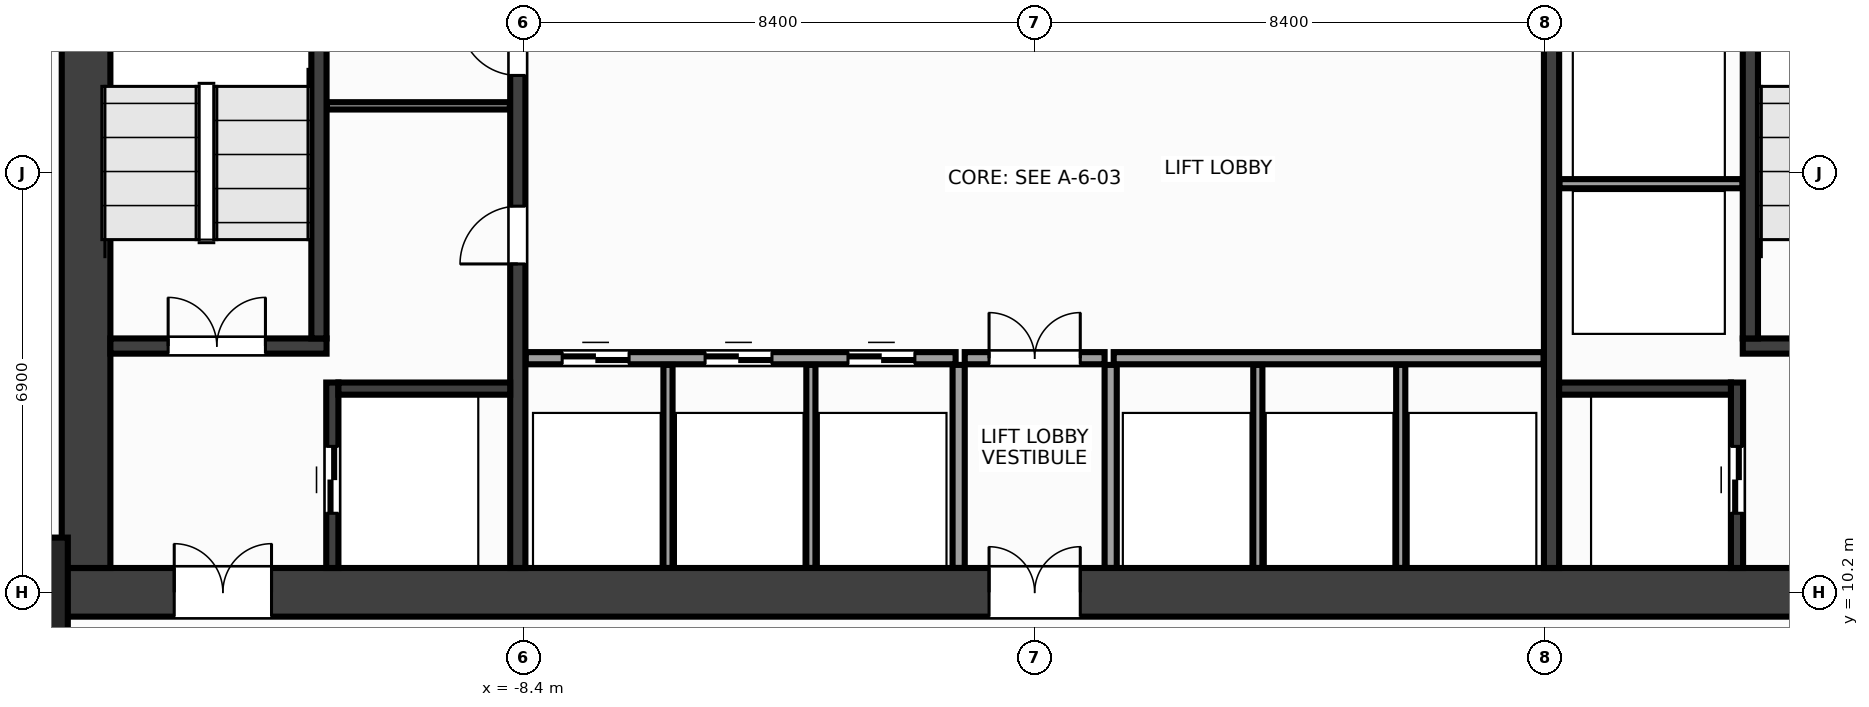
"""IFC4 building model, lengths in metres.
Left out: names, types, materials, properties, quantities, classifications, styles, units other than length and angle.
Written with IfcOpenShell. Run it as: python <this file> out.ifc"""

import sys

from ifc_helpers import new_model, si_unit, direction, frame, frame_2d, origin, origin_2d, place, context, subcontext, project, spatial, rectangle, extrude, source, transform, mapped, element, fill, save


model = new_model("IFC4")
c1 = context("Model", 3, precision=1e-05, world=origin(), true_north=direction((0.0, 1.0)))
c2 = subcontext(c1, "Body", "Model", "MODEL_VIEW")
j1 = project(units=[si_unit("LENGTHUNIT", "METRE"), si_unit("PLANEANGLEUNIT", "RADIAN")], contexts=[c1])
p1 = place(None, origin())
s1 = spatial("IfcSite", under=j1, at=p1, CompositionType="ELEMENT")
p2 = place(p1, origin())
s2 = spatial("IfcBuilding", under=s1, at=p2, CompositionType="ELEMENT")
p3 = place(p2, frame((0.0, 0.0, 41.6)))
s3 = spatial("IfcBuildingStorey", under=s2, at=p3, CompositionType="ELEMENT", Elevation=41.6)
m1 = source(origin(), c2, "Body", "SweptSolid", [
    extrude(rectangle(XDim=32.0, YDim=0.8, at=frame_2d((16.0, 0.0))), origin(), (0.0, 0.0, 1.0), 3.6),
])
p4 = place(p3, frame((-16.0, 10.2, 0.0), z_axis=(0.0, 0.0, 1.0), x_axis=(1.0, 0.0, 0.0)))
e1 = element("IfcWall", 1, at=p4, inside=s3, PredefinedType="SHEAR", context=c2, shape_type="MappedRepresentation", body=[
    mapped(m1, transform((0.0, 0.0, 0.0), x_axis=(1.0, 0.0, 0.0), y_axis=(0.0, 1.0, 0.0), z_axis=(0.0, 0.0, 1.0), scale=1.0)),
])
p5 = place(p4, frame((1.85, 0.0, 0.0)))
e2 = element("IfcOpeningElement", 2, at=p5, cuts=e1, PredefinedType="OPENING", context=c2, shape_type="SweptSolid", body=[
    extrude(rectangle(XDim=1.6, YDim=2.15, at=frame_2d((0.8, 1.075))), frame((0.0, 0.412, 0.0), z_axis=(0.0, -1.0, 0.0), x_axis=(1.0, 0.0, 0.0)), (0.0, 0.0, 1.0), 0.824),
])
p6 = place(p4, frame((28.55, 0.0, 0.0)))
e3 = element("IfcOpeningElement", 3, at=p6, cuts=e1, PredefinedType="OPENING", context=c2, shape_type="SweptSolid", body=[
    extrude(rectangle(XDim=1.6, YDim=2.15, at=frame_2d((0.8, 1.075))), frame((0.0, 0.412, 0.0), z_axis=(0.0, -1.0, 0.0), x_axis=(1.0, 0.0, 0.0)), (0.0, 0.0, 1.0), 0.824),
])
p7 = place(p4, frame((15.25, 0.0, 0.0)))
e4 = element("IfcOpeningElement", 4, at=p7, cuts=e1, PredefinedType="OPENING", context=c2, shape_type="SweptSolid", body=[
    extrude(rectangle(XDim=1.5, YDim=2.2, at=frame_2d((0.75, 1.1))), frame((0.0, 0.412, 0.0), z_axis=(0.0, -1.0, 0.0), x_axis=(1.0, 0.0, 0.0)), (0.0, 0.0, 1.0), 0.824),
])
m2 = source(origin(), c2, "Body", "SweptSolid", [
    extrude(rectangle(XDim=12.8, YDim=0.8, at=frame_2d((6.4, 0.0))), origin(), (0.0, 0.0, 1.0), 3.6),
])
p8 = place(p3, frame((-15.6, 10.6, 0.0), z_axis=(0.0, 0.0, 1.0), x_axis=(0.0, 1.0, 0.0)))
e5 = element("IfcWall", 5, at=p8, inside=s3, PredefinedType="SHEAR", context=c2, shape_type="MappedRepresentation", body=[
    mapped(m2, transform((0.0, 0.0, 0.0), x_axis=(1.0, 0.0, 0.0), y_axis=(0.0, 1.0, 0.0), z_axis=(0.0, 0.0, 1.0), scale=1.0)),
])
m3 = source(origin(), c2, "Body", "SweptSolid", [
    extrude(rectangle(XDim=12.8, YDim=0.25, at=frame_2d((6.4, 0.0))), origin(), (0.0, 0.0, 1.0), 3.6),
])
p9 = place(p3, frame((-8.5, 10.6, 0.0), z_axis=(0.0, 0.0, 1.0), x_axis=(0.0, 1.0, 0.0)))
e6 = element("IfcWall", 6, at=p9, inside=s3, PredefinedType="SHEAR", context=c2, shape_type="MappedRepresentation", body=[
    mapped(m3, transform((0.0, 0.0, 0.0), x_axis=(1.0, 0.0, 0.0), y_axis=(0.0, 1.0, 0.0), z_axis=(0.0, 0.0, 1.0), scale=1.0)),
])
p10 = place(p9, frame((5.0, 0.0, 0.0)))
e7 = element("IfcOpeningElement", 7, at=p10, cuts=e6, PredefinedType="OPENING", context=c2, shape_type="SweptSolid", body=[
    extrude(rectangle(XDim=0.95, YDim=2.15, at=frame_2d((0.475, 1.075))), frame((0.0, 0.137, 0.0), z_axis=(0.0, -1.0, 0.0), x_axis=(1.0, 0.0, 0.0)), (0.0, 0.0, 1.0), 0.274),
])
p11 = place(p9, frame((8.1, 0.0, 0.0)))
e8 = element("IfcOpeningElement", 8, at=p11, cuts=e6, PredefinedType="OPENING", context=c2, shape_type="SweptSolid", body=[
    extrude(rectangle(XDim=0.95, YDim=2.15, at=frame_2d((0.475, 1.075))), frame((0.0, 0.137, 0.0), z_axis=(0.0, -1.0, 0.0), x_axis=(1.0, 0.0, 0.0)), (0.0, 0.0, 1.0), 0.274),
])
p12 = place(p3, frame((8.5, 10.6, 0.0), z_axis=(0.0, 0.0, 1.0), x_axis=(0.0, 1.0, 0.0)))
e9 = element("IfcWall", 9, at=p12, inside=s3, PredefinedType="SHEAR", context=c2, shape_type="MappedRepresentation", body=[
    mapped(m3, transform((0.0, 0.0, 0.0), x_axis=(1.0, 0.0, 0.0), y_axis=(0.0, 1.0, 0.0), z_axis=(0.0, 0.0, 1.0), scale=1.0)),
])
p13 = place(p12, frame((9.85, 0.0, 0.0)))
e10 = element("IfcOpeningElement", 10, at=p13, cuts=e9, PredefinedType="OPENING", context=c2, shape_type="SweptSolid", body=[
    extrude(rectangle(XDim=0.95, YDim=2.15, at=frame_2d((0.475, 1.075))), frame((0.0, 0.137, 0.0), z_axis=(0.0, -1.0, 0.0), x_axis=(1.0, 0.0, 0.0)), (0.0, 0.0, 1.0), 0.274),
])
m4 = source(origin(), c2, "Body", "SweptSolid", [
    extrude(rectangle(XDim=3.555, YDim=0.25, at=frame_2d((1.777, 0.0))), origin(), (0.0, 0.0, 1.0), 3.6),
])
p14 = place(p3, frame((-15.2, 14.25, 0.0), z_axis=(0.0, 0.0, 1.0), x_axis=(1.0, 0.0, 0.0)))
e11 = element("IfcWall", 11, at=p14, inside=s3, PredefinedType="SHEAR", context=c2, shape_type="MappedRepresentation", body=[
    mapped(m4, transform((0.0, 0.0, 0.0), x_axis=(1.0, 0.0, 0.0), y_axis=(0.0, 1.0, 0.0), z_axis=(0.0, 0.0, 1.0), scale=1.0)),
])
p15 = place(p14, frame((0.95, 0.0, 0.0)))
e12 = element("IfcOpeningElement", 12, at=p15, cuts=e11, PredefinedType="OPENING", context=c2, shape_type="SweptSolid", body=[
    extrude(rectangle(XDim=1.6, YDim=2.15, at=frame_2d((0.8, 1.075))), frame((0.0, 0.137, 0.0), z_axis=(0.0, -1.0, 0.0), x_axis=(1.0, 0.0, 0.0)), (0.0, 0.0, 1.0), 0.274),
])
m5 = source(origin(), c2, "Body", "SweptSolid", [
    extrude(rectangle(XDim=9.025, YDim=0.25, at=frame_2d((4.512, 0.0))), origin(), (0.0, 0.0, 1.0), 3.6),
])
p16 = place(p3, frame((-11.77, 14.375, 0.0), z_axis=(0.0, 0.0, 1.0), x_axis=(0.0, 1.0, 0.0)))
e13 = element("IfcWall", 13, at=p16, inside=s3, PredefinedType="SHEAR", context=c2, shape_type="MappedRepresentation", body=[
    mapped(m5, transform((0.0, 0.0, 0.0), x_axis=(1.0, 0.0, 0.0), y_axis=(0.0, 1.0, 0.0), z_axis=(0.0, 0.0, 1.0), scale=1.0)),
])
p17 = place(p3, frame((11.645, 14.25, 0.0), z_axis=(0.0, 0.0, 1.0), x_axis=(1.0, 0.0, 0.0)))
e14 = element("IfcWall", 14, at=p17, inside=s3, PredefinedType="SHEAR", context=c2, shape_type="MappedRepresentation", body=[
    mapped(m4, transform((0.0, 0.0, 0.0), x_axis=(1.0, 0.0, 0.0), y_axis=(0.0, 1.0, 0.0), z_axis=(0.0, 0.0, 1.0), scale=1.0)),
])
p18 = place(p17, frame((0.95, 0.0, 0.0)))
e15 = element("IfcOpeningElement", 15, at=p18, cuts=e14, PredefinedType="OPENING", context=c2, shape_type="SweptSolid", body=[
    extrude(rectangle(XDim=1.6, YDim=2.15, at=frame_2d((0.8, 1.075))), frame((0.0, 0.137, 0.0), z_axis=(0.0, -1.0, 0.0), x_axis=(1.0, 0.0, 0.0)), (0.0, 0.0, 1.0), 0.274),
])
p19 = place(p3, frame((11.77, 14.375, 0.0), z_axis=(0.0, 0.0, 1.0), x_axis=(0.0, 1.0, 0.0)))
e16 = element("IfcWall", 16, at=p19, inside=s3, PredefinedType="SHEAR", context=c2, shape_type="MappedRepresentation", body=[
    mapped(m5, transform((0.0, 0.0, 0.0), x_axis=(1.0, 0.0, 0.0), y_axis=(0.0, 1.0, 0.0), z_axis=(0.0, 0.0, 1.0), scale=1.0)),
])
m6 = source(origin(), c2, "Body", "SweptSolid", [
    extrude(rectangle(XDim=3.05, YDim=0.2, at=frame_2d((1.525, 0.0))), origin(), (0.0, 0.0, 1.0), 3.6),
])
p20 = place(p3, frame((-11.55, 10.6, 0.0), z_axis=(0.0, 0.0, 1.0), x_axis=(0.0, 1.0, 0.0)))
e17 = element("IfcWall", 17, at=p20, inside=s3, PredefinedType="SHEAR", context=c2, shape_type="MappedRepresentation", body=[
    mapped(m6, transform((0.0, 0.0, 0.0), x_axis=(1.0, 0.0, 0.0), y_axis=(0.0, 1.0, 0.0), z_axis=(0.0, 0.0, 1.0), scale=1.0)),
])
p21 = place(p20, frame((0.9, 0.0, 0.0)))
e18 = element("IfcOpeningElement", 18, at=p21, cuts=e17, PredefinedType="OPENING", context=c2, shape_type="SweptSolid", body=[
    extrude(rectangle(XDim=1.1, YDim=2.15, at=frame_2d((0.55, 1.075))), frame((0.0, 0.112, 0.0), z_axis=(0.0, -1.0, 0.0), x_axis=(1.0, 0.0, 0.0)), (0.0, 0.0, 1.0), 0.224),
])
m7 = source(origin(), c2, "Body", "SweptSolid", [
    extrude(rectangle(XDim=2.825, YDim=0.2, at=frame_2d((1.413, 0.0))), origin(), (0.0, 0.0, 1.0), 3.6),
])
p22 = place(p3, frame((-11.45, 13.55, 0.0), z_axis=(0.0, 0.0, 1.0), x_axis=(1.0, 0.0, 0.0)))
e19 = element("IfcWall", 19, at=p22, inside=s3, PredefinedType="SHEAR", context=c2, shape_type="MappedRepresentation", body=[
    mapped(m7, transform((0.0, 0.0, 0.0), x_axis=(1.0, 0.0, 0.0), y_axis=(0.0, 1.0, 0.0), z_axis=(0.0, 0.0, 1.0), scale=1.0)),
])
p23 = place(p3, frame((11.55, 10.6, 0.0), z_axis=(0.0, 0.0, 1.0), x_axis=(0.0, 1.0, 0.0)))
e20 = element("IfcWall", 20, at=p23, inside=s3, PredefinedType="SHEAR", context=c2, shape_type="MappedRepresentation", body=[
    mapped(m6, transform((0.0, 0.0, 0.0), x_axis=(1.0, 0.0, 0.0), y_axis=(0.0, 1.0, 0.0), z_axis=(0.0, 0.0, 1.0), scale=1.0)),
])
p24 = place(p23, frame((0.9, 0.0, 0.0)))
e21 = element("IfcOpeningElement", 21, at=p24, cuts=e20, PredefinedType="OPENING", context=c2, shape_type="SweptSolid", body=[
    extrude(rectangle(XDim=1.1, YDim=2.15, at=frame_2d((0.55, 1.075))), frame((0.0, 0.112, 0.0), z_axis=(0.0, -1.0, 0.0), x_axis=(1.0, 0.0, 0.0)), (0.0, 0.0, 1.0), 0.224),
])
p25 = place(p3, frame((8.625, 13.55, 0.0), z_axis=(0.0, 0.0, 1.0), x_axis=(1.0, 0.0, 0.0)))
e22 = element("IfcWall", 22, at=p25, inside=s3, PredefinedType="SHEAR", context=c2, shape_type="MappedRepresentation", body=[
    mapped(m7, transform((0.0, 0.0, 0.0), x_axis=(1.0, 0.0, 0.0), y_axis=(0.0, 1.0, 0.0), z_axis=(0.0, 0.0, 1.0), scale=1.0)),
])
m8 = source(origin(), c2, "Body", "SweptSolid", [
    extrude(rectangle(XDim=1.8, YDim=1.8, at=origin_2d()), origin(), (0.0, 0.0, 1.0), 3.6),
])
p26 = place(p3, frame((-16.8, 10.2, 0.0), z_axis=(0.0, 0.0, 1.0), x_axis=(1.0, 0.0, 0.0)))
e23 = element("IfcColumn", 23, at=p26, inside=s3, PredefinedType="COLUMN", context=c2, shape_type="MappedRepresentation", body=[
    mapped(m8, transform((0.0, 0.0, 0.0), x_axis=(1.0, 0.0, 0.0), y_axis=(0.0, 1.0, 0.0), z_axis=(0.0, 0.0, 1.0), scale=1.0)),
])
m9 = source(origin(), c2, "Body", "SweptSolid", [
    extrude(rectangle(XDim=3.01, YDim=0.12, at=frame_2d((1.505, 0.0))), origin(), (0.0, 0.0, 1.0), 3.36),
])
p27 = place(p3, frame((-11.64, 18.2, 0.0), z_axis=(0.0, 0.0, 1.0), x_axis=(1.0, 0.0, 0.0)))
e24 = element("IfcWall", 24, at=p27, inside=s3, PredefinedType="PARTITIONING", context=c2, shape_type="MappedRepresentation", body=[
    mapped(m9, transform((0.0, 0.0, 0.0), x_axis=(1.0, 0.0, 0.0), y_axis=(0.0, 1.0, 0.0), z_axis=(0.0, 0.0, 1.0), scale=1.0)),
])
m10 = source(origin(), c2, "Body", "SweptSolid", [
    extrude(rectangle(XDim=3.01, YDim=0.15, at=frame_2d((1.505, 0.0))), origin(), (0.0, 0.0, 1.0), 3.36),
])
p28 = place(p3, frame((8.63, 16.92, 0.0), z_axis=(0.0, 0.0, 1.0), x_axis=(1.0, 0.0, 0.0)))
e25 = element("IfcWall", 25, at=p28, inside=s3, PredefinedType="PARTITIONING", context=c2, shape_type="MappedRepresentation", body=[
    mapped(m10, transform((0.0, 0.0, 0.0), x_axis=(1.0, 0.0, 0.0), y_axis=(0.0, 1.0, 0.0), z_axis=(0.0, 0.0, 1.0), scale=1.0)),
])
m11 = source(origin(), c2, "Body", "SweptSolid", [
    extrude(rectangle(XDim=7.07, YDim=0.2, at=frame_2d((3.535, 0.0))), origin(), (0.0, 0.0, 1.0), 3.36),
])
p29 = place(p3, frame((-8.37, 14.05, 0.0), z_axis=(0.0, 0.0, 1.0), x_axis=(1.0, 0.0, 0.0)))
e26 = element("IfcWall", 26, at=p29, inside=s3, PredefinedType="PARTITIONING", context=c2, shape_type="MappedRepresentation", body=[
    mapped(m11, transform((0.0, 0.0, 0.0), x_axis=(1.0, 0.0, 0.0), y_axis=(0.0, 1.0, 0.0), z_axis=(0.0, 0.0, 1.0), scale=1.0)),
])
p30 = place(p29, frame((0.6, 0.0, 0.0)))
e27 = element("IfcOpeningElement", 27, at=p30, cuts=e26, PredefinedType="OPENING", context=c2, shape_type="SweptSolid", body=[
    extrude(rectangle(XDim=1.1, YDim=2.15, at=frame_2d((0.55, 1.075))), frame((0.0, 0.112, 0.0), z_axis=(0.0, -1.0, 0.0), x_axis=(1.0, 0.0, 0.0)), (0.0, 0.0, 1.0), 0.224),
])
p31 = place(p29, frame((2.95, 0.0, 0.0)))
e28 = element("IfcOpeningElement", 28, at=p31, cuts=e26, PredefinedType="OPENING", context=c2, shape_type="SweptSolid", body=[
    extrude(rectangle(XDim=1.1, YDim=2.15, at=frame_2d((0.55, 1.075))), frame((0.0, 0.112, 0.0), z_axis=(0.0, -1.0, 0.0), x_axis=(1.0, 0.0, 0.0)), (0.0, 0.0, 1.0), 0.224),
])
p32 = place(p29, frame((5.3, 0.0, 0.0)))
e29 = element("IfcOpeningElement", 29, at=p32, cuts=e26, PredefinedType="OPENING", context=c2, shape_type="SweptSolid", body=[
    extrude(rectangle(XDim=1.1, YDim=2.15, at=frame_2d((0.55, 1.075))), frame((0.0, 0.112, 0.0), z_axis=(0.0, -1.0, 0.0), x_axis=(1.0, 0.0, 0.0)), (0.0, 0.0, 1.0), 0.224),
])
p33 = place(p3, frame((1.3, 14.05, 0.0), z_axis=(0.0, 0.0, 1.0), x_axis=(1.0, 0.0, 0.0)))
e30 = element("IfcWall", 30, at=p33, inside=s3, PredefinedType="PARTITIONING", context=c2, shape_type="MappedRepresentation", body=[
    mapped(m11, transform((0.0, 0.0, 0.0), x_axis=(1.0, 0.0, 0.0), y_axis=(0.0, 1.0, 0.0), z_axis=(0.0, 0.0, 1.0), scale=1.0)),
])
m12 = source(origin(), c2, "Body", "SweptSolid", [
    extrude(rectangle(XDim=3.34, YDim=0.2, at=frame_2d((1.67, 0.0))), origin(), (0.0, 0.0, 1.0), 3.36),
])
for number, where, z_axis, x_axis in (
    (31, (-1.25, 10.6, 0.0), (0.0, 0.0, 1.0), (0.0, 1.0, 0.0)),
    (32, (1.25, 10.6, 0.0), (0.0, 0.0, 1.0), (0.0, 1.0, 0.0)),
):
    element("IfcWall", number, at=place(p3, frame(where, z_axis=z_axis, x_axis=x_axis)), inside=s3, PredefinedType="PARTITIONING", context=c2, shape_type="MappedRepresentation", body=[
        mapped(m12, transform((0.0, 0.0, 0.0), x_axis=(1.0, 0.0, 0.0), y_axis=(0.0, 1.0, 0.0), z_axis=(0.0, 0.0, 1.0), scale=1.0)),
    ])
m13 = source(origin(), c2, "Body", "SweptSolid", [
    extrude(rectangle(XDim=2.3, YDim=0.2, at=frame_2d((1.15, 0.0))), origin(), (0.0, 0.0, 1.0), 3.36),
])
p34 = place(p3, frame((-1.15, 14.05, 0.0), z_axis=(0.0, 0.0, 1.0), x_axis=(1.0, 0.0, 0.0)))
e33 = element("IfcWall", 33, at=p34, inside=s3, PredefinedType="PARTITIONING", context=c2, shape_type="MappedRepresentation", body=[
    mapped(m13, transform((0.0, 0.0, 0.0), x_axis=(1.0, 0.0, 0.0), y_axis=(0.0, 1.0, 0.0), z_axis=(0.0, 0.0, 1.0), scale=1.0)),
])
p35 = place(p34, frame((0.4, 0.0, 0.0)))
e34 = element("IfcOpeningElement", 34, at=p35, cuts=e33, PredefinedType="OPENING", context=c2, shape_type="SweptSolid", body=[
    extrude(rectangle(XDim=1.5, YDim=2.2, at=frame_2d((0.75, 1.1))), frame((0.0, 0.112, 0.0), z_axis=(0.0, -1.0, 0.0), x_axis=(1.0, 0.0, 0.0)), (0.0, 0.0, 1.0), 0.224),
])
m14 = source(origin(), c2, "Body", "SweptSolid", [
    extrude(rectangle(XDim=3.34, YDim=0.15, at=frame_2d((1.67, 0.0))), origin(), (0.0, 0.0, 1.0), 3.36),
])
for number, where, z_axis, x_axis in (
    (35, (-6.03, 10.6, 0.0), (0.0, 0.0, 1.0), (0.0, 1.0, 0.0)),
    (36, (-3.68, 10.6, 0.0), (0.0, 0.0, 1.0), (0.0, 1.0, 0.0)),
    (37, (3.67, 10.6, 0.0), (0.0, 0.0, 1.0), (0.0, 1.0, 0.0)),
    (38, (6.02, 10.6, 0.0), (0.0, 0.0, 1.0), (0.0, 1.0, 0.0)),
):
    element("IfcWall", number, at=place(p3, frame(where, z_axis=z_axis, x_axis=x_axis)), inside=s3, PredefinedType="PARTITIONING", context=c2, shape_type="MappedRepresentation", body=[
        mapped(m14, transform((0.0, 0.0, 0.0), x_axis=(1.0, 0.0, 0.0), y_axis=(0.0, 1.0, 0.0), z_axis=(0.0, 0.0, 1.0), scale=1.0)),
    ])
m15 = source(origin(), c2, "Body", "SweptSolid", [
    extrude(rectangle(XDim=1.6, YDim=2.15, at=frame_2d((0.8, 1.075))), frame((0.0, 0.025, 0.0), z_axis=(0.0, -1.0, 0.0), x_axis=(1.0, 0.0, 0.0)), (0.0, 0.0, 1.0), 0.05),
])
p36 = place(p15, origin())
e39 = element("IfcDoor", 39, at=p36, inside=s3, OperationType="DOUBLE_DOOR_SINGLE_SWING", PredefinedType="DOOR", context=c2, shape_type="MappedRepresentation", body=[
    mapped(m15, transform((0.0, 0.0, 0.0), x_axis=(1.0, 0.0, 0.0), y_axis=(0.0, 1.0, 0.0), z_axis=(0.0, 0.0, 1.0), scale=1.0)),
])
fill(e12, e39)
p37 = place(p5, origin())
e40 = element("IfcDoor", 40, at=p37, inside=s3, OperationType="DOUBLE_DOOR_SINGLE_SWING", PredefinedType="DOOR", context=c2, shape_type="MappedRepresentation", body=[
    mapped(m15, transform((0.0, 0.0, 0.0), x_axis=(1.0, 0.0, 0.0), y_axis=(0.0, 1.0, 0.0), z_axis=(0.0, 0.0, 1.0), scale=1.0)),
])
fill(e2, e40)
m16 = source(origin(), c2, "Body", "SweptSolid", [
    extrude(rectangle(XDim=1.1, YDim=2.15, at=frame_2d((0.55, 1.075))), frame((0.0, 0.025, 0.0), z_axis=(0.0, -1.0, 0.0), x_axis=(1.0, 0.0, 0.0)), (0.0, 0.0, 1.0), 0.05),
])
p38 = place(p21, origin())
e41 = element("IfcDoor", 41, at=p38, inside=s3, OperationType="DOUBLE_DOOR_SLIDING", PredefinedType="DOOR", context=c2, shape_type="MappedRepresentation", body=[
    mapped(m16, transform((0.0, 0.0, 0.0), x_axis=(1.0, 0.0, 0.0), y_axis=(0.0, 1.0, 0.0), z_axis=(0.0, 0.0, 1.0), scale=1.0)),
])
fill(e18, e41)
p39 = place(p24, origin())
e42 = element("IfcDoor", 42, at=p39, inside=s3, OperationType="DOUBLE_DOOR_SLIDING", PredefinedType="DOOR", context=c2, shape_type="MappedRepresentation", body=[
    mapped(m16, transform((0.0, 0.0, 0.0), x_axis=(1.0, 0.0, 0.0), y_axis=(0.0, 1.0, 0.0), z_axis=(0.0, 0.0, 1.0), scale=1.0)),
])
fill(e21, e42)
m17 = source(origin(), c2, "Body", "SweptSolid", [
    extrude(rectangle(XDim=0.95, YDim=2.15, at=frame_2d((0.475, 1.075))), frame((0.0, 0.025, 0.0), z_axis=(0.0, -1.0, 0.0), x_axis=(1.0, 0.0, 0.0)), (0.0, 0.0, 1.0), 0.05),
])
p40 = place(p10, origin())
e43 = element("IfcDoor", 43, at=p40, inside=s3, OperationType="SINGLE_SWING_LEFT", PredefinedType="DOOR", context=c2, shape_type="MappedRepresentation", body=[
    mapped(m17, transform((0.0, 0.0, 0.0), x_axis=(1.0, 0.0, 0.0), y_axis=(0.0, 1.0, 0.0), z_axis=(0.0, 0.0, 1.0), scale=1.0)),
])
fill(e7, e43)
p41 = place(p11, origin())
e44 = element("IfcDoor", 44, at=p41, inside=s3, OperationType="SINGLE_SWING_RIGHT", PredefinedType="DOOR", context=c2, shape_type="MappedRepresentation", body=[
    mapped(m17, transform((0.0, 0.0, 0.0), x_axis=(1.0, 0.0, 0.0), y_axis=(0.0, 1.0, 0.0), z_axis=(0.0, 0.0, 1.0), scale=1.0)),
])
fill(e8, e44)
p42 = place(p30, origin())
e45 = element("IfcDoor", 45, at=p42, inside=s3, OperationType="DOUBLE_DOOR_SLIDING", PredefinedType="DOOR", context=c2, shape_type="MappedRepresentation", body=[
    mapped(m16, transform((0.0, 0.0, 0.0), x_axis=(1.0, 0.0, 0.0), y_axis=(0.0, 1.0, 0.0), z_axis=(0.0, 0.0, 1.0), scale=1.0)),
])
fill(e27, e45)
p43 = place(p31, origin())
e46 = element("IfcDoor", 46, at=p43, inside=s3, OperationType="DOUBLE_DOOR_SLIDING", PredefinedType="DOOR", context=c2, shape_type="MappedRepresentation", body=[
    mapped(m16, transform((0.0, 0.0, 0.0), x_axis=(1.0, 0.0, 0.0), y_axis=(0.0, 1.0, 0.0), z_axis=(0.0, 0.0, 1.0), scale=1.0)),
])
fill(e28, e46)
p44 = place(p32, origin())
e47 = element("IfcDoor", 47, at=p44, inside=s3, OperationType="DOUBLE_DOOR_SLIDING", PredefinedType="DOOR", context=c2, shape_type="MappedRepresentation", body=[
    mapped(m16, transform((0.0, 0.0, 0.0), x_axis=(1.0, 0.0, 0.0), y_axis=(0.0, 1.0, 0.0), z_axis=(0.0, 0.0, 1.0), scale=1.0)),
])
fill(e29, e47)
m18 = source(origin(), c2, "Body", "SweptSolid", [
    extrude(rectangle(XDim=1.5, YDim=2.2, at=frame_2d((0.75, 1.1))), frame((0.0, 0.025, 0.0), z_axis=(0.0, -1.0, 0.0), x_axis=(1.0, 0.0, 0.0)), (0.0, 0.0, 1.0), 0.05),
])
p45 = place(p35, origin())
e48 = element("IfcDoor", 48, at=p45, inside=s3, OperationType="DOUBLE_DOOR_SINGLE_SWING", PredefinedType="DOOR", context=c2, shape_type="MappedRepresentation", body=[
    mapped(m18, transform((0.0, 0.0, 0.0), x_axis=(1.0, 0.0, 0.0), y_axis=(0.0, 1.0, 0.0), z_axis=(0.0, 0.0, 1.0), scale=1.0)),
])
fill(e34, e48)
p46 = place(p7, origin())
e49 = element("IfcDoor", 49, at=p46, inside=s3, OperationType="DOUBLE_DOOR_SINGLE_SWING", PredefinedType="DOOR", context=c2, shape_type="MappedRepresentation", body=[
    mapped(m18, transform((0.0, 0.0, 0.0), x_axis=(1.0, 0.0, 0.0), y_axis=(0.0, 1.0, 0.0), z_axis=(0.0, 0.0, 1.0), scale=1.0)),
])
fill(e4, e49)
save(model, sys.argv[1])
